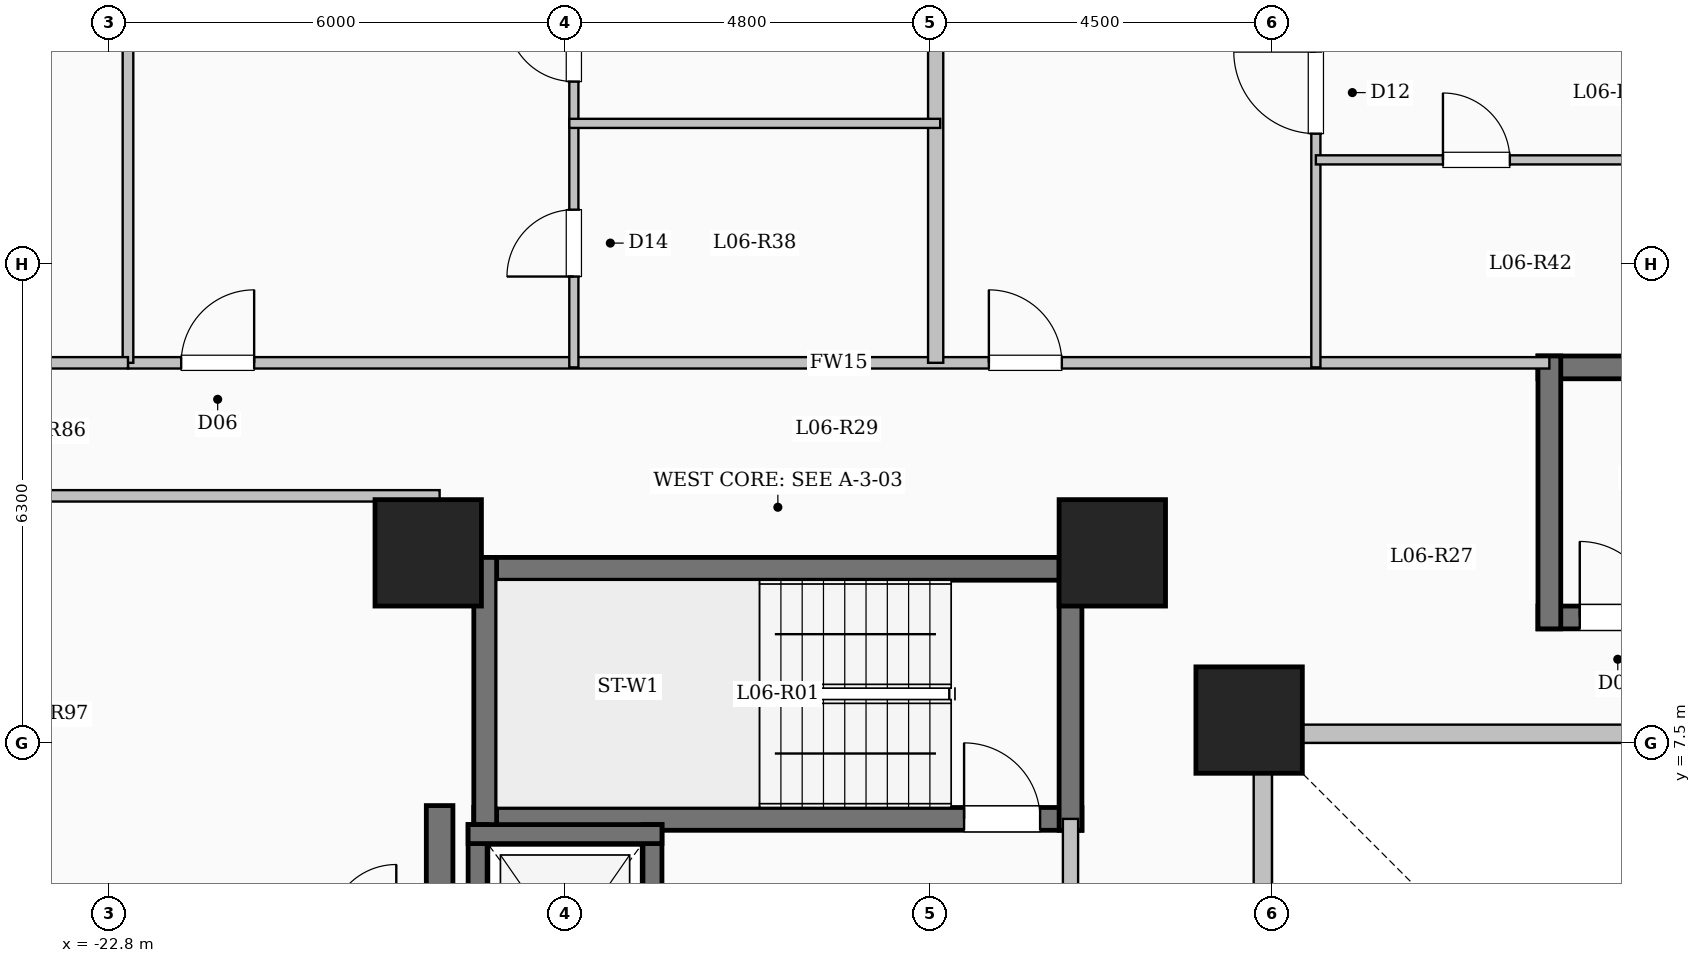
"""IFC4 building model, lengths in metres.
Left out: names, types, materials, properties, quantities, classifications, styles, units other than length and angle.
Written with IfcOpenShell. Run it as: python <this file> out.ifc"""

import sys

from ifc_helpers import new_model, si_unit, direction, frame, frame_2d, origin, origin_2d, place, context, subcontext, project, spatial, rectangle, extrude, element, fill, save


model = new_model("IFC4")
c1 = context("Model", 3, precision=1e-05, world=origin(), true_north=direction((0.0, 1.0)))
c2 = subcontext(c1, "Body", "Model", "MODEL_VIEW")
j1 = project(units=[si_unit("LENGTHUNIT", "METRE"), si_unit("PLANEANGLEUNIT", "RADIAN")], contexts=[c1])
p1 = place(None, origin())
s1 = spatial("IfcSite", under=j1, at=p1, CompositionType="ELEMENT")
p2 = place(p1, origin())
s2 = spatial("IfcBuilding", under=s1, at=p2, CompositionType="ELEMENT")
p3 = place(p2, frame((0.0, 0.0, 27.35)))
s3 = spatial("IfcBuildingStorey", under=s2, at=p3, CompositionType="ELEMENT", Elevation=27.35)
for number, where, z_axis, x_axis in (
    (1, (-7.8, 7.8, 0.0), (0.0, 0.0, 1.0), (1.0, 0.0, 0.0)),
    (2, (-9.6, 10.0, 0.0), (0.0, 0.0, 1.0), (1.0, 0.0, 0.0)),
    (3, (-18.6, 10.0, 0.0), (0.0, 0.0, 1.0), (1.0, 0.0, 0.0)),
):
    element("IfcColumn", number, at=place(p3, frame(where, z_axis=z_axis, x_axis=x_axis)), inside=s3, PredefinedType="COLUMN", context=c2, shape_type="SweptSolid", body=[
        extrude(rectangle(XDim=1.4, YDim=1.4, at=origin_2d()), origin(), (0.0, 0.0, 1.0), 3.35),
    ])
p4 = place(p3, frame((7.62, 7.62, 0.0), z_axis=(0.0, 0.0, 1.0), x_axis=(-1.0, 0.0, 0.0)))
e4 = element("IfcWall", 4, at=p4, inside=s3, PredefinedType="SOLIDWALL", context=c2, shape_type="SweptSolid", body=[
    extrude(rectangle(XDim=15.24, YDim=0.24, at=frame_2d((7.62, 0.0))), origin(), (0.0, 0.0, 1.0), 3.1),
])
p5 = place(p4, frame((6.92, 0.0, 0.95)))
e5 = element("IfcOpeningElement", 5, at=p5, cuts=e4, PredefinedType="OPENING", context=c2, shape_type="SweptSolid", body=[
    extrude(rectangle(XDim=1.4, YDim=1.5, at=frame_2d((0.7, 0.75))), frame((0.0, 0.13, 0.0), z_axis=(0.0, -1.0, 0.0), x_axis=(1.0, 0.0, 0.0)), (0.0, 0.0, 1.0), 0.26),
])
p6 = place(p3, frame((-7.62, 7.62, 0.0), z_axis=(0.0, 0.0, 1.0), x_axis=(0.0, -1.0, 0.0)))
e6 = element("IfcWall", 6, at=p6, inside=s3, PredefinedType="SOLIDWALL", context=c2, shape_type="SweptSolid", body=[
    extrude(rectangle(XDim=15.24, YDim=0.24, at=frame_2d((7.62, 0.0))), origin(), (0.0, 0.0, 1.0), 3.1),
])
p7 = place(p6, frame((6.92, 0.0, 0.95)))
e7 = element("IfcOpeningElement", 7, at=p7, cuts=e6, PredefinedType="OPENING", context=c2, shape_type="SweptSolid", body=[
    extrude(rectangle(XDim=1.4, YDim=1.5, at=frame_2d((0.7, 0.75))), frame((0.0, 0.13, 0.0), z_axis=(0.0, -1.0, 0.0), x_axis=(1.0, 0.0, 0.0)), (0.0, 0.0, 1.0), 0.26),
])
p8 = place(p3, frame((-18.0, 9.79, 0.0), z_axis=(0.0, 0.0, 1.0), x_axis=(1.0, 0.0, 0.0)))
e8 = element("IfcWall", 8, at=p8, inside=s3, PredefinedType="SHEAR", context=c2, shape_type="SweptSolid", body=[
    extrude(rectangle(XDim=8.0, YDim=0.3, at=frame_2d((4.0, 0.0))), origin(), (0.0, 0.0, 1.0), 3.35),
])
p9 = place(p3, frame((-18.0, 6.5, 0.0), z_axis=(0.0, 0.0, 1.0), x_axis=(1.0, 0.0, 0.0)))
e9 = element("IfcWall", 9, at=p9, inside=s3, PredefinedType="SHEAR", context=c2, shape_type="SweptSolid", body=[
    extrude(rectangle(XDim=8.0, YDim=0.3, at=frame_2d((4.0, 0.0))), origin(), (0.0, 0.0, 1.0), 3.35),
])
p10 = place(p9, frame((6.45, 0.0, 0.0)))
e10 = element("IfcOpeningElement", 10, at=p10, cuts=e9, PredefinedType="OPENING", context=c2, shape_type="SweptSolid", body=[
    extrude(rectangle(XDim=1.0, YDim=2.15, at=frame_2d((0.5, 1.075))), frame((0.0, 0.16, 0.0), z_axis=(0.0, -1.0, 0.0), x_axis=(1.0, 0.0, 0.0)), (0.0, 0.0, 1.0), 0.32),
])
for number, where, z_axis, x_axis in (
    (11, (-17.85, 6.35, 0.0), (0.0, 0.0, 1.0), (0.0, 1.0, 0.0)),
    (12, (-10.15, 6.35, 0.0), (0.0, 0.0, 1.0), (0.0, 1.0, 0.0)),
):
    element("IfcWall", number, at=place(p3, frame(where, z_axis=z_axis, x_axis=x_axis)), inside=s3, PredefinedType="SHEAR", context=c2, shape_type="SweptSolid", body=[
        extrude(rectangle(XDim=3.59, YDim=0.3, at=frame_2d((1.795, 0.0))), origin(), (0.0, 0.0, 1.0), 3.35),
    ])
p11 = place(p3, frame((-4.0, 12.44, 0.0), z_axis=(0.0, 0.0, 1.0), x_axis=(1.0, 0.0, 0.0)))
e13 = element("IfcWall", 13, at=p11, inside=s3, PredefinedType="SHEAR", context=c2, shape_type="SweptSolid", body=[
    extrude(rectangle(XDim=8.0, YDim=0.3, at=frame_2d((4.0, 0.0))), origin(), (0.0, 0.0, 1.0), 3.35),
])
p12 = place(p3, frame((-4.0, 9.15, 0.0), z_axis=(0.0, 0.0, 1.0), x_axis=(1.0, 0.0, 0.0)))
e14 = element("IfcWall", 14, at=p12, inside=s3, PredefinedType="SHEAR", context=c2, shape_type="SweptSolid", body=[
    extrude(rectangle(XDim=8.0, YDim=0.3, at=frame_2d((4.0, 0.0))), origin(), (0.0, 0.0, 1.0), 3.35),
])
p13 = place(p12, frame((0.55, 0.0, 0.0)))
e15 = element("IfcOpeningElement", 15, at=p13, cuts=e14, PredefinedType="OPENING", context=c2, shape_type="SweptSolid", body=[
    extrude(rectangle(XDim=1.0, YDim=2.15, at=frame_2d((0.5, 1.075))), frame((0.0, 0.16, 0.0), z_axis=(0.0, -1.0, 0.0), x_axis=(1.0, 0.0, 0.0)), (0.0, 0.0, 1.0), 0.32),
])
p14 = place(p3, frame((-3.85, 9.0, 0.0), z_axis=(0.0, 0.0, 1.0), x_axis=(0.0, 1.0, 0.0)))
e16 = element("IfcWall", 16, at=p14, inside=s3, PredefinedType="SHEAR", context=c2, shape_type="SweptSolid", body=[
    extrude(rectangle(XDim=3.59, YDim=0.3, at=frame_2d((1.795, 0.0))), origin(), (0.0, 0.0, 1.0), 3.35),
])
p15 = place(p3, frame((-10.15, 3.25, 0.0), z_axis=(0.0, 0.0, 1.0), x_axis=(0.0, 1.0, 0.0)))
e17 = element("IfcWall", 17, at=p15, inside=s3, PredefinedType="SOLIDWALL", context=c2, shape_type="SweptSolid", body=[
    extrude(rectangle(XDim=3.25, YDim=0.2, at=frame_2d((1.625, 0.0))), origin(), (0.0, 0.0, 1.0), 3.1),
])
p16 = place(p15, frame((1.1, 0.0, 0.0)))
e18 = element("IfcOpeningElement", 18, at=p16, cuts=e17, PredefinedType="OPENING", context=c2, shape_type="SweptSolid", body=[
    extrude(rectangle(XDim=1.02, YDim=2.15, at=frame_2d((0.51, 1.075))), frame((0.0, 0.11, 0.0), z_axis=(0.0, -1.0, 0.0), x_axis=(1.0, 0.0, 0.0)), (0.0, 0.0, 1.0), 0.22),
])
p17 = place(p3, frame((-17.95, 3.175, 0.0), z_axis=(0.0, 0.0, 1.0), x_axis=(0.0, 1.0, 0.0)))
e19 = element("IfcWall", 19, at=p17, inside=s3, PredefinedType="SHEAR", context=c2, shape_type="SweptSolid", body=[
    extrude(rectangle(XDim=3.25, YDim=0.25, at=frame_2d((1.625, 0.0))), origin(), (0.0, 0.0, 1.0), 3.35),
])
p18 = place(p3, frame((-15.65, 3.175, 0.0), z_axis=(0.0, 0.0, 1.0), x_axis=(0.0, 1.0, 0.0)))
e20 = element("IfcWall", 20, at=p18, inside=s3, PredefinedType="SHEAR", context=c2, shape_type="SweptSolid", body=[
    extrude(rectangle(XDim=3.25, YDim=0.25, at=frame_2d((1.625, 0.0))), origin(), (0.0, 0.0, 1.0), 3.35),
])
p19 = place(p18, frame((1.075, 0.0, 0.0)))
e21 = element("IfcOpeningElement", 21, at=p19, cuts=e20, PredefinedType="OPENING", context=c2, shape_type="SweptSolid", body=[
    extrude(rectangle(XDim=1.1, YDim=2.15, at=frame_2d((0.55, 1.075))), frame((0.0, 0.135, 0.0), z_axis=(0.0, -1.0, 0.0), x_axis=(1.0, 0.0, 0.0)), (0.0, 0.0, 1.0), 0.27),
])
p20 = place(p3, frame((-18.075, 6.3, 0.0), z_axis=(0.0, 0.0, 1.0), x_axis=(1.0, 0.0, 0.0)))
e22 = element("IfcWall", 22, at=p20, inside=s3, PredefinedType="SHEAR", context=c2, shape_type="SweptSolid", body=[
    extrude(rectangle(XDim=2.55, YDim=0.25, at=frame_2d((1.275, 0.0))), origin(), (0.0, 0.0, 1.0), 3.35),
])
p21 = place(p3, frame((-18.45, -7.375, 0.0), z_axis=(0.0, 0.0, 1.0), x_axis=(0.0, 1.0, 0.0)))
e23 = element("IfcWall", 23, at=p21, inside=s3, PredefinedType="SHEAR", context=c2, shape_type="SweptSolid", body=[
    extrude(rectangle(XDim=14.05, YDim=0.35, at=frame_2d((7.025, 0.0))), origin(), (0.0, 0.0, 1.0), 3.35),
])
p22 = place(p3, frame((-22.55, 12.5, 0.0), z_axis=(0.0, 0.0, 1.0), x_axis=(1.0, 0.0, 0.0)))
e24 = element("IfcWall", 24, at=p22, inside=s3, PredefinedType="PARTITIONING", context=c2, shape_type="SweptSolid", body=[
    extrude(rectangle(XDim=18.7, YDim=0.15, at=frame_2d((9.35, 0.0))), origin(), (0.0, 0.0, 1.0), 3.1),
])
p23 = place(p22, frame((0.7, 0.0, 0.0)))
e25 = element("IfcOpeningElement", 25, at=p23, cuts=e24, PredefinedType="OPENING", context=c2, shape_type="SweptSolid", body=[
    extrude(rectangle(XDim=0.96, YDim=2.15, at=frame_2d((0.48, 1.075))), frame((0.0, 0.085, 0.0), z_axis=(0.0, -1.0, 0.0), x_axis=(1.0, 0.0, 0.0)), (0.0, 0.0, 1.0), 0.17),
])
p24 = place(p22, frame((11.326, 0.0, 0.0)))
e26 = element("IfcOpeningElement", 26, at=p24, cuts=e24, PredefinedType="OPENING", context=c2, shape_type="SweptSolid", body=[
    extrude(rectangle(XDim=0.96, YDim=2.15, at=frame_2d((0.48, 1.075))), frame((0.0, 0.085, 0.0), z_axis=(0.0, -1.0, 0.0), x_axis=(1.0, 0.0, 0.0)), (0.0, 0.0, 1.0), 0.17),
])
p25 = place(p3, frame((-11.924, 12.5, 0.0), z_axis=(0.0, 0.0, 1.0), x_axis=(0.0, 1.0, 0.0)))
e27 = element("IfcWall", 27, at=p25, inside=s3, PredefinedType="SOLIDWALL", context=c2, shape_type="SweptSolid", body=[
    extrude(rectangle(XDim=11.1, YDim=0.2, at=frame_2d((5.55, 0.0))), origin(), (0.0, 0.0, 1.0), 3.1),
])
p26 = place(p3, frame((-16.684, 12.44, 0.0), z_axis=(0.0, 0.0, 1.0), x_axis=(0.0, 1.0, 0.0)))
e28 = element("IfcWall", 28, at=p26, inside=s3, PredefinedType="PARTITIONING", context=c2, shape_type="SweptSolid", body=[
    extrude(rectangle(XDim=3.21, YDim=0.12, at=frame_2d((1.605, 0.0))), origin(), (0.0, 0.0, 1.0), 3.1),
])
p27 = place(p26, frame((1.195, 0.0, 0.0)))
e29 = element("IfcOpeningElement", 29, at=p27, cuts=e28, PredefinedType="OPENING", context=c2, shape_type="SweptSolid", body=[
    extrude(rectangle(XDim=0.88, YDim=2.1, at=frame_2d((0.44, 1.05))), frame((0.0, 0.07, 0.0), z_axis=(0.0, -1.0, 0.0), x_axis=(1.0, 0.0, 0.0)), (0.0, 0.0, 1.0), 0.14),
])
p28 = place(p3, frame((-16.684, 15.65, 0.0), z_axis=(0.0, 0.0, 1.0), x_axis=(0.0, 1.0, 0.0)))
e30 = element("IfcWall", 30, at=p28, inside=s3, PredefinedType="PARTITIONING", context=c2, shape_type="SweptSolid", body=[
    extrude(rectangle(XDim=7.95, YDim=0.12, at=frame_2d((3.975, 0.0))), origin(), (0.0, 0.0, 1.0), 3.1),
])
p29 = place(p28, frame((0.55, 0.0, 0.0)))
e31 = element("IfcOpeningElement", 31, at=p29, cuts=e30, PredefinedType="OPENING", context=c2, shape_type="SweptSolid", body=[
    extrude(rectangle(XDim=0.88, YDim=2.1, at=frame_2d((0.44, 1.05))), frame((0.0, 0.07, 0.0), z_axis=(0.0, -1.0, 0.0), x_axis=(1.0, 0.0, 0.0)), (0.0, 0.0, 1.0), 0.14),
])
p30 = place(p3, frame((-16.744, 15.65, 0.0), z_axis=(0.0, 0.0, 1.0), x_axis=(1.0, 0.0, 0.0)))
e32 = element("IfcWall", 32, at=p30, inside=s3, PredefinedType="PARTITIONING", context=c2, shape_type="SweptSolid", body=[
    extrude(rectangle(XDim=4.88, YDim=0.12, at=frame_2d((2.44, 0.0))), origin(), (0.0, 0.0, 1.0), 3.1),
])
p31 = place(p3, frame((-6.922, 12.44, 0.0), z_axis=(0.0, 0.0, 1.0), x_axis=(0.0, 1.0, 0.0)))
e33 = element("IfcWall", 33, at=p31, inside=s3, PredefinedType="PARTITIONING", context=c2, shape_type="SweptSolid", body=[
    extrude(rectangle(XDim=12.166, YDim=0.12, at=frame_2d((6.083, 0.0))), origin(), (0.0, 0.0, 1.0), 3.1),
])
p32 = place(p31, frame((3.075, 0.0, 0.0)))
e34 = element("IfcOpeningElement", 34, at=p32, cuts=e33, PredefinedType="OPENING", context=c2, shape_type="SweptSolid", body=[
    extrude(rectangle(XDim=1.08, YDim=2.15, at=frame_2d((0.54, 1.075))), frame((0.0, 0.07, 0.0), z_axis=(0.0, -1.0, 0.0), x_axis=(1.0, 0.0, 0.0)), (0.0, 0.0, 1.0), 0.14),
])
p33 = place(p3, frame((-6.922, 15.17, 0.0), z_axis=(0.0, 0.0, 1.0), x_axis=(1.0, 0.0, 0.0)))
e35 = element("IfcWall", 35, at=p33, inside=s3, PredefinedType="PARTITIONING", context=c2, shape_type="SweptSolid", body=[
    extrude(rectangle(XDim=4.225, YDim=0.12, at=frame_2d((2.113, 0.0))), origin(), (0.0, 0.0, 1.0), 3.1),
])
p34 = place(p33, frame((1.672, 0.0, 0.0)))
e36 = element("IfcOpeningElement", 36, at=p34, cuts=e35, PredefinedType="OPENING", context=c2, shape_type="SweptSolid", body=[
    extrude(rectangle(XDim=0.88, YDim=2.1, at=frame_2d((0.44, 1.05))), frame((0.0, 0.07, 0.0), z_axis=(0.0, -1.0, 0.0), x_axis=(1.0, 0.0, 0.0)), (0.0, 0.0, 1.0), 0.14),
])
p35 = place(p3, frame((-28.68, 10.75, 0.0), z_axis=(0.0, 0.0, 1.0), x_axis=(1.0, 0.0, 0.0)))
e37 = element("IfcWall", 37, at=p35, inside=s3, PredefinedType="PARTITIONING", context=c2, shape_type="SweptSolid", body=[
    extrude(rectangle(XDim=10.23, YDim=0.15, at=frame_2d((5.115, 0.0))), origin(), (0.0, 0.0, 1.0), 3.1),
])
p36 = place(p3, frame((-22.55, 12.5, 0.0), z_axis=(0.0, 0.0, 1.0), x_axis=(0.0, 1.0, 0.0)))
e38 = element("IfcWall", 38, at=p36, inside=s3, PredefinedType="PARTITIONING", context=c2, shape_type="SweptSolid", body=[
    extrude(rectangle(XDim=6.55, YDim=0.14, at=frame_2d((3.275, 0.0))), origin(), (0.0, 0.0, 1.0), 3.1),
])
p37 = place(p3, frame((-28.68, 12.5, 0.0), z_axis=(0.0, 0.0, 1.0), x_axis=(1.0, 0.0, 0.0)))
e39 = element("IfcWall", 39, at=p37, inside=s3, PredefinedType="PARTITIONING", context=c2, shape_type="SweptSolid", body=[
    extrude(rectangle(XDim=6.13, YDim=0.15, at=frame_2d((3.065, 0.0))), origin(), (0.0, 0.0, 1.0), 3.1),
])
p38 = place(p37, frame((2.59, 0.0, 0.0)))
e40 = element("IfcOpeningElement", 40, at=p38, cuts=e39, PredefinedType="OPENING", context=c2, shape_type="SweptSolid", body=[
    extrude(rectangle(XDim=0.95, YDim=2.15, at=frame_2d((0.475, 1.075))), frame((0.0, 0.085, 0.0), z_axis=(0.0, -1.0, 0.0), x_axis=(1.0, 0.0, 0.0)), (0.0, 0.0, 1.0), 0.17),
])
p39 = place(p10, origin())
e41 = element("IfcDoor", 41, at=p39, inside=s3, OperationType="SINGLE_SWING_LEFT", PredefinedType="DOOR", context=c2, shape_type="SweptSolid", body=[
    extrude(rectangle(XDim=1.0, YDim=2.15, at=frame_2d((0.5, 1.075))), frame((0.0, 0.025, 0.0), z_axis=(0.0, -1.0, 0.0), x_axis=(1.0, 0.0, 0.0)), (0.0, 0.0, 1.0), 0.05),
])
fill(e10, e41)
p40 = place(p13, origin())
e42 = element("IfcDoor", 42, at=p40, inside=s3, OperationType="SINGLE_SWING_LEFT", PredefinedType="DOOR", context=c2, shape_type="SweptSolid", body=[
    extrude(rectangle(XDim=1.0, YDim=2.15, at=frame_2d((0.5, 1.075))), frame((0.0, 0.025, 0.0), z_axis=(0.0, -1.0, 0.0), x_axis=(1.0, 0.0, 0.0)), (0.0, 0.0, 1.0), 0.05),
])
fill(e15, e42)
p41 = place(p23, origin())
e43 = element("IfcDoor", 43, at=p41, inside=s3, OperationType="SINGLE_SWING_RIGHT", PredefinedType="DOOR", context=c2, shape_type="SweptSolid", body=[
    extrude(rectangle(XDim=0.96, YDim=2.15, at=frame_2d((0.48, 1.075))), frame((0.0, 0.025, 0.0), z_axis=(0.0, -1.0, 0.0), x_axis=(1.0, 0.0, 0.0)), (0.0, 0.0, 1.0), 0.05),
])
fill(e25, e43)
p42 = place(p27, origin())
e44 = element("IfcDoor", 44, at=p42, inside=s3, OperationType="SINGLE_SWING_LEFT", PredefinedType="DOOR", context=c2, shape_type="SweptSolid", body=[
    extrude(rectangle(XDim=0.88, YDim=2.1, at=frame_2d((0.44, 1.05))), frame((0.0, 0.025, 0.0), z_axis=(0.0, -1.0, 0.0), x_axis=(1.0, 0.0, 0.0)), (0.0, 0.0, 1.0), 0.05),
])
fill(e29, e44)
p43 = place(p29, origin())
e45 = element("IfcDoor", 45, at=p43, inside=s3, OperationType="SINGLE_SWING_RIGHT", PredefinedType="DOOR", context=c2, shape_type="SweptSolid", body=[
    extrude(rectangle(XDim=0.88, YDim=2.1, at=frame_2d((0.44, 1.05))), frame((0.0, 0.025, 0.0), z_axis=(0.0, -1.0, 0.0), x_axis=(1.0, 0.0, 0.0)), (0.0, 0.0, 1.0), 0.05),
])
fill(e31, e45)
p44 = place(p24, origin())
e46 = element("IfcDoor", 46, at=p44, inside=s3, OperationType="SINGLE_SWING_LEFT", PredefinedType="DOOR", context=c2, shape_type="SweptSolid", body=[
    extrude(rectangle(XDim=0.96, YDim=2.15, at=frame_2d((0.48, 1.075))), frame((0.0, 0.025, 0.0), z_axis=(0.0, -1.0, 0.0), x_axis=(1.0, 0.0, 0.0)), (0.0, 0.0, 1.0), 0.05),
])
fill(e26, e46)
p45 = place(p32, origin())
e47 = element("IfcDoor", 47, at=p45, inside=s3, OperationType="SINGLE_SWING_RIGHT", PredefinedType="DOOR", context=c2, shape_type="SweptSolid", body=[
    extrude(rectangle(XDim=1.08, YDim=2.15, at=frame_2d((0.54, 1.075))), frame((0.0, 0.025, 0.0), z_axis=(0.0, -1.0, 0.0), x_axis=(1.0, 0.0, 0.0)), (0.0, 0.0, 1.0), 0.05),
])
fill(e34, e47)
p46 = place(p34, origin())
e48 = element("IfcDoor", 48, at=p46, inside=s3, OperationType="SINGLE_SWING_LEFT", PredefinedType="DOOR", context=c2, shape_type="SweptSolid", body=[
    extrude(rectangle(XDim=0.88, YDim=2.1, at=frame_2d((0.44, 1.05))), frame((0.0, 0.025, 0.0), z_axis=(0.0, -1.0, 0.0), x_axis=(1.0, 0.0, 0.0)), (0.0, 0.0, 1.0), 0.05),
])
fill(e36, e48)
save(model, sys.argv[1])
